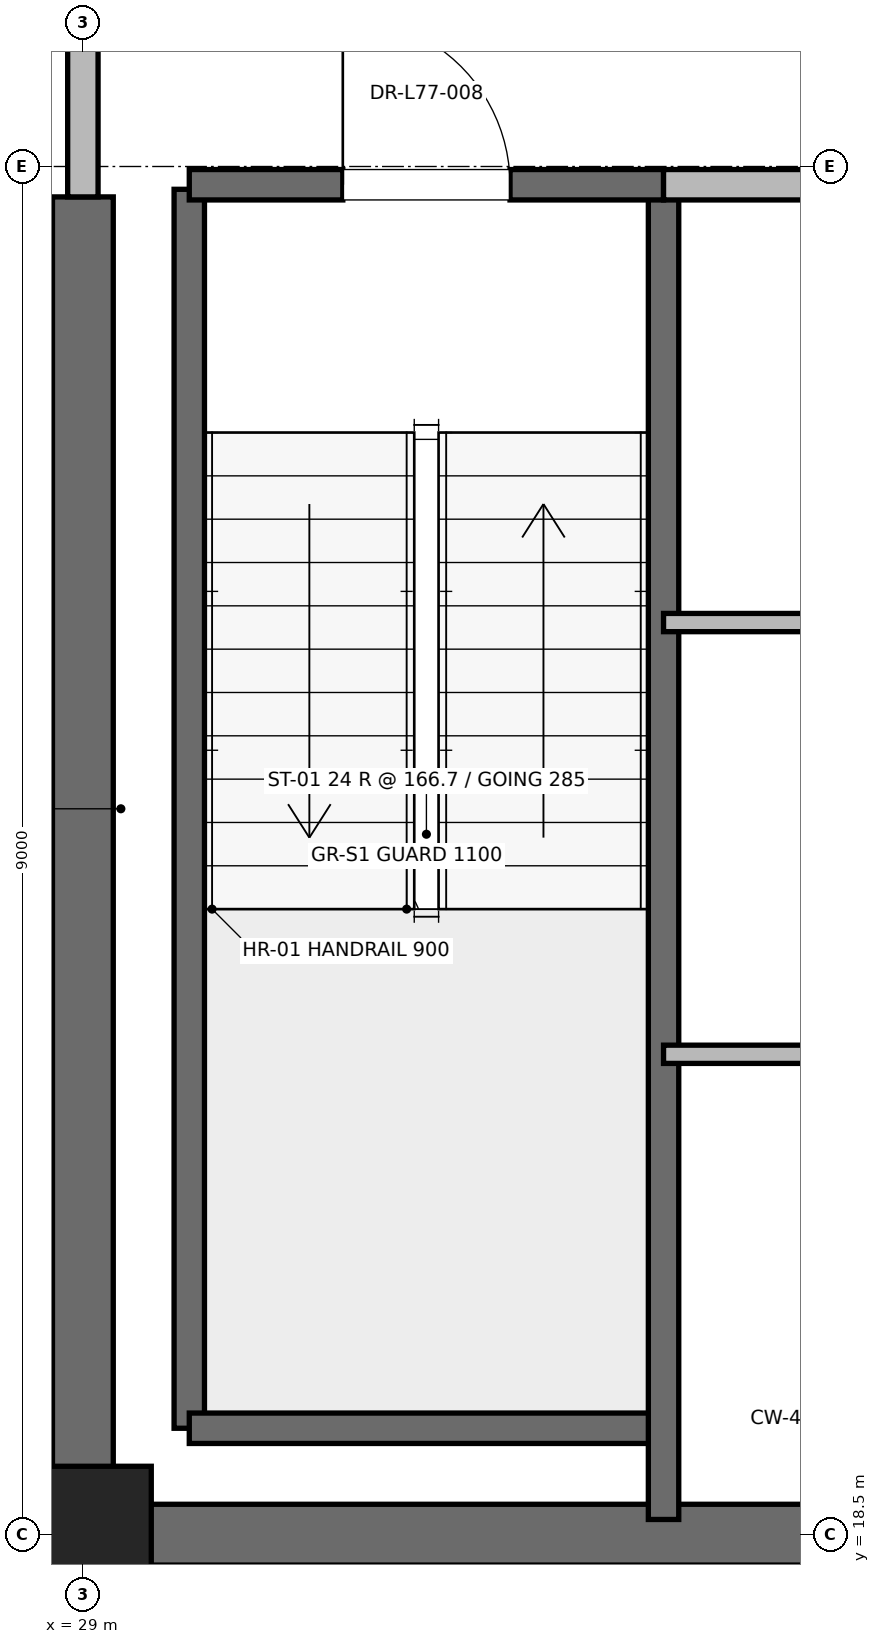
"""IFC4 building model, lengths in metres.
Left out: names, types, materials, properties, quantities, classifications, styles, units other than length and angle.
Written with IfcOpenShell. Run it as: python <this file> out.ifc"""

import sys

from ifc_helpers import new_model, si_unit, direction, frame, frame_2d, origin, origin_2d, place, context, subcontext, project, spatial, rectangle, extrude, element, fill, save


model = new_model("IFC4")
c1 = context("Model", 3, precision=1e-05, world=origin(), true_north=direction((0.0, 1.0)))
c2 = subcontext(c1, "Body", "Model", "MODEL_VIEW")
j1 = project(units=[si_unit("LENGTHUNIT", "METRE"), si_unit("PLANEANGLEUNIT", "RADIAN")], contexts=[c1])
p1 = place(None, origin())
s1 = spatial("IfcSite", under=j1, at=p1, CompositionType="ELEMENT")
p2 = place(p1, origin())
s2 = spatial("IfcBuilding", under=s1, at=p2, CompositionType="ELEMENT")
p3 = place(p2, frame((0.0, 0.0, 330.8)))
s3 = spatial("IfcBuildingStorey", under=s2, at=p3, CompositionType="ELEMENT", Elevation=330.8)
p4 = place(p3, frame((29.0, 18.5, 0.0), z_axis=(0.0, 0.0, 1.0), x_axis=(1.0, 0.0, 0.0)))
e1 = element("IfcColumn", 1, at=p4, inside=s3, PredefinedType="PILASTER", context=c2, shape_type="SweptSolid", body=[
    extrude(rectangle(XDim=0.9, YDim=0.9, at=origin_2d()), origin(), (0.0, 0.0, 1.0), 4.0),
])
p5 = place(p3, frame((29.0, 18.5, 0.0), z_axis=(0.0, 0.0, 1.0), x_axis=(1.0, 0.0, 0.0)))
e2 = element("IfcWall", 2, at=p5, inside=s3, PredefinedType="SHEAR", context=c2, shape_type="SweptSolid", body=[
    extrude(rectangle(XDim=9.2, YDim=0.4, at=frame_2d((4.6, 0.0))), origin(), (0.0, 0.0, 1.0), 3.785),
])
p6 = place(p3, frame((29.0, 18.5, 0.0), z_axis=(0.0, 0.0, 1.0), x_axis=(0.0, 1.0, 0.0)))
e3 = element("IfcWall", 3, at=p6, inside=s3, PredefinedType="SHEAR", context=c2, shape_type="SweptSolid", body=[
    extrude(rectangle(XDim=8.8, YDim=0.4, at=frame_2d((4.4, 0.0))), origin(), (0.0, 0.0, 1.0), 3.785),
])
p7 = place(p3, frame((29.7, 19.2, 0.0), z_axis=(0.0, 0.0, 1.0), x_axis=(0.0, 1.0, 0.0)))
e4 = element("IfcWall", 4, at=p7, inside=s3, PredefinedType="SOLIDWALL", context=c2, shape_type="SweptSolid", body=[
    extrude(rectangle(XDim=8.15, YDim=0.2, at=frame_2d((4.075, 0.0))), origin(), (0.0, 0.0, 1.0), 3.785),
])
p8 = place(p3, frame((29.7, 19.2, 0.0), z_axis=(0.0, 0.0, 1.0), x_axis=(1.0, 0.0, 0.0)))
e5 = element("IfcWall", 5, at=p8, inside=s3, PredefinedType="SOLIDWALL", context=c2, shape_type="SweptSolid", body=[
    extrude(rectangle(XDim=3.12, YDim=0.2, at=frame_2d((1.56, 0.0))), origin(), (0.0, 0.0, 1.0), 3.785),
])
p9 = place(p3, frame((32.82, 18.6, 0.0), z_axis=(0.0, 0.0, 1.0), x_axis=(0.0, 1.0, 0.0)))
e6 = element("IfcWall", 6, at=p9, inside=s3, PredefinedType="SOLIDWALL", context=c2, shape_type="SweptSolid", body=[
    extrude(rectangle(XDim=8.78, YDim=0.2, at=frame_2d((4.39, 0.0))), origin(), (0.0, 0.0, 1.0), 3.785),
])
p10 = place(p3, frame((29.7, 27.38, 0.0), z_axis=(0.0, 0.0, 1.0), x_axis=(1.0, 0.0, 0.0)))
e7 = element("IfcWall", 7, at=p10, inside=s3, PredefinedType="SOLIDWALL", context=c2, shape_type="SweptSolid", body=[
    extrude(rectangle(XDim=3.12, YDim=0.2, at=frame_2d((1.56, 0.0))), origin(), (0.0, 0.0, 1.0), 3.785),
])
p11 = place(p10, frame((1.01, 0.0, 0.0)))
e8 = element("IfcOpeningElement", 8, at=p11, cuts=e7, PredefinedType="OPENING", context=c2, shape_type="SweptSolid", body=[
    extrude(rectangle(XDim=1.1, YDim=2.15, at=frame_2d((0.55, 1.075))), frame((0.0, 0.1, 0.0), z_axis=(0.0, -1.0, 0.0), x_axis=(1.0, 0.0, 0.0)), (0.0, 0.0, 1.0), 0.2),
])
p12 = place(p3, frame((29.0, 27.3, 0.0), z_axis=(0.0, 0.0, 1.0), x_axis=(0.0, 1.0, 0.0)))
e9 = element("IfcWall", 9, at=p12, inside=s3, PredefinedType="PARTITIONING", context=c2, shape_type="SweptSolid", body=[
    extrude(rectangle(XDim=3.4, YDim=0.2, at=frame_2d((1.7, 0.0))), origin(), (0.0, 0.0, 1.0), 2.865),
])
p13 = place(p12, frame((1.125, 0.0, 0.0)))
e10 = element("IfcOpeningElement", 10, at=p13, cuts=e9, PredefinedType="OPENING", context=c2, shape_type="SweptSolid", body=[
    extrude(rectangle(XDim=1.15, YDim=2.2, at=frame_2d((0.575, 1.1))), frame((0.0, 0.1, 0.0), z_axis=(0.0, -1.0, 0.0), x_axis=(1.0, 0.0, 0.0)), (0.0, 0.0, 1.0), 0.2),
])
p14 = place(p3, frame((32.82, 27.38, 0.0), z_axis=(0.0, 0.0, 1.0), x_axis=(1.0, 0.0, 0.0)))
e11 = element("IfcWall", 11, at=p14, inside=s3, PredefinedType="PARTITIONING", context=c2, shape_type="SweptSolid", body=[
    extrude(rectangle(XDim=5.62, YDim=0.2, at=frame_2d((2.81, 0.0))), origin(), (0.0, 0.0, 1.0), 3.785),
])
for number, where, z_axis, x_axis in (
    (12, (32.82, 21.66, 0.0), (0.0, 0.0, 1.0), (1.0, 0.0, 0.0)),
    (13, (32.82, 24.5, 0.0), (0.0, 0.0, 1.0), (1.0, 0.0, 0.0)),
):
    element("IfcWall", number, at=place(p3, frame(where, z_axis=z_axis, x_axis=x_axis)), inside=s3, PredefinedType="PARTITIONING", context=c2, shape_type="SweptSolid", body=[
        extrude(rectangle(XDim=5.23, YDim=0.12, at=frame_2d((2.615, 0.0))), origin(), (0.0, 0.0, 1.0), 2.85),
    ])
p15 = place(p11, origin())
e14 = element("IfcDoor", 14, at=p15, inside=s3, OperationType="SINGLE_SWING_LEFT", PredefinedType="DOOR", context=c2, shape_type="SweptSolid", body=[
    extrude(rectangle(XDim=1.1, YDim=2.15, at=frame_2d((0.55, 1.075))), frame((0.0, 0.025, 0.0), z_axis=(0.0, -1.0, 0.0), x_axis=(1.0, 0.0, 0.0)), (0.0, 0.0, 1.0), 0.05),
])
fill(e8, e14)
save(model, sys.argv[1])
